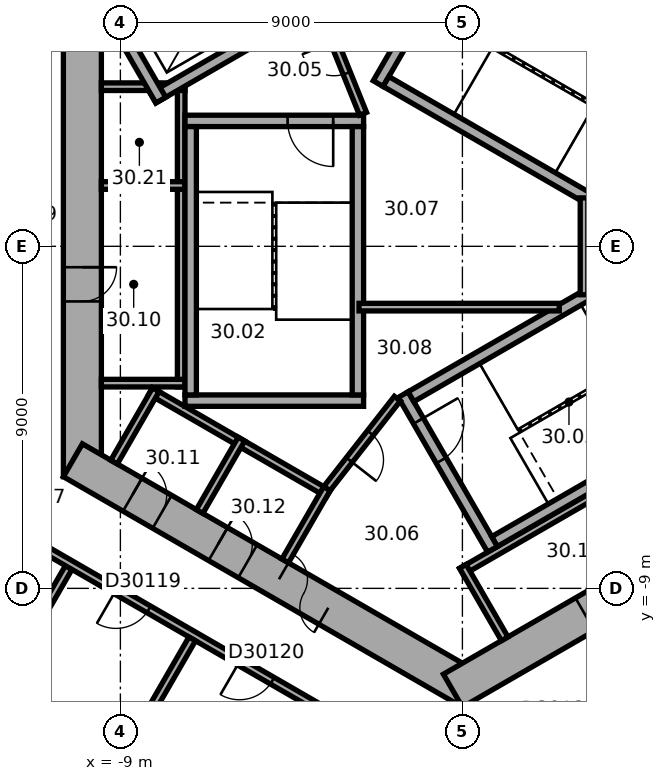
"""IFC4 building model, lengths in metres.
Left out: names, types, materials, properties, quantities, classifications, styles, units other than length and angle.
Written with IfcOpenShell. Run it as: python <this file> out.ifc"""

import sys

from ifc_helpers import new_model, si_unit, direction, frame, frame_2d, origin, place, context, subcontext, project, spatial, rectangle, extrude, element, fill, save


model = new_model("IFC4")
c1 = context("Model", 3, precision=1e-05, world=origin(), true_north=direction((0.0, 1.0)))
c2 = subcontext(c1, "Body", "Model", "MODEL_VIEW")
j1 = project(units=[si_unit("LENGTHUNIT", "METRE"), si_unit("PLANEANGLEUNIT", "RADIAN")], contexts=[c1])
p1 = place(None, origin())
s1 = spatial("IfcSite", under=j1, at=p1, CompositionType="ELEMENT")
p2 = place(p1, origin())
s2 = spatial("IfcBuilding", under=s1, at=p2, CompositionType="ELEMENT")
p3 = place(p2, frame((0.0, 0.0, 124.4)))
s3 = spatial("IfcBuildingStorey", under=s2, at=p3, CompositionType="ELEMENT", Elevation=124.4)
p4 = place(p3, frame((-10.0, 6.062, 0.0), z_axis=(0.0, 0.0, 1.0), x_axis=(0.0, -1.0, 0.0)))
e1 = element("IfcWall", 1, at=p4, inside=s3, PredefinedType="SHEAR", context=c2, shape_type="SweptSolid", body=[
    extrude(rectangle(XDim=12.125, YDim=1.0, at=frame_2d((6.062, 0.0))), origin(), (0.0, 0.0, 1.0), 3.7),
])
p5 = place(p4, frame((6.612, 0.0, 0.0)))
e2 = element("IfcOpeningElement", 2, at=p5, cuts=e1, PredefinedType="OPENING", context=c2, shape_type="SweptSolid", body=[
    extrude(rectangle(XDim=0.9, YDim=2.1, at=frame_2d((0.45, 1.05))), frame((0.0, 0.51, 0.0), z_axis=(0.0, -1.0, 0.0), x_axis=(1.0, 0.0, 0.0)), (0.0, 0.0, 1.0), 1.02),
])
p6 = place(p3, frame((-10.25, -5.629, 0.0), z_axis=(0.0, 0.0, 1.0), x_axis=(0.866022616891, -0.50000482701, 0.0)))
e3 = element("IfcWall", 3, at=p6, inside=s3, PredefinedType="SHEAR", context=c2, shape_type="SweptSolid", body=[
    extrude(rectangle(XDim=12.125, YDim=1.0, at=frame_2d((6.062, 0.0))), origin(), (0.0, 0.0, 1.0), 3.7),
])
p7 = place(p6, frame((6.262, 0.0, 0.0)))
e4 = element("IfcOpeningElement", 4, at=p7, cuts=e3, PredefinedType="OPENING", context=c2, shape_type="SweptSolid", body=[
    extrude(rectangle(XDim=1.5, YDim=2.1, at=frame_2d((0.75, 1.05))), frame((0.0, 0.51, 0.0), z_axis=(0.0, -1.0, 0.0), x_axis=(1.0, 0.0, 0.0)), (0.0, 0.0, 1.0), 1.02),
])
p8 = place(p6, frame((1.812, 0.0, 0.0)))
e5 = element("IfcOpeningElement", 5, at=p8, cuts=e3, PredefinedType="OPENING", context=c2, shape_type="SweptSolid", body=[
    extrude(rectangle(XDim=0.9, YDim=2.1, at=frame_2d((0.45, 1.05))), frame((0.0, 0.51, 0.0), z_axis=(0.0, -1.0, 0.0), x_axis=(1.0, 0.0, 0.0)), (0.0, 0.0, 1.0), 1.02),
])
p9 = place(p6, frame((4.412, 0.0, 0.0)))
e6 = element("IfcOpeningElement", 6, at=p9, cuts=e3, PredefinedType="OPENING", context=c2, shape_type="SweptSolid", body=[
    extrude(rectangle(XDim=0.9, YDim=2.1, at=frame_2d((0.45, 1.05))), frame((0.0, 0.51, 0.0), z_axis=(0.0, -1.0, 0.0), x_axis=(1.0, 0.0, 0.0)), (0.0, 0.0, 1.0), 1.02),
])
p10 = place(p3, frame((-0.25, -11.691, 0.0), z_axis=(0.0, 0.0, 1.0), x_axis=(0.866022616891, 0.50000482701, 0.0)))
e7 = element("IfcWall", 7, at=p10, inside=s3, PredefinedType="SHEAR", context=c2, shape_type="SweptSolid", body=[
    extrude(rectangle(XDim=12.125, YDim=1.0, at=frame_2d((6.062, 0.0))), origin(), (0.0, 0.0, 1.0), 3.7),
])
p11 = place(p10, frame((4.012, 0.0, 0.0)))
e8 = element("IfcOpeningElement", 8, at=p11, cuts=e7, PredefinedType="OPENING", context=c2, shape_type="SweptSolid", body=[
    extrude(rectangle(XDim=0.9, YDim=2.1, at=frame_2d((0.45, 1.05))), frame((0.0, 0.51, 0.0), z_axis=(0.0, -1.0, 0.0), x_axis=(1.0, 0.0, 0.0)), (0.0, 0.0, 1.0), 1.02),
])
p12 = place(p10, frame((7.812, 0.0, 0.0)))
e9 = element("IfcOpeningElement", 9, at=p12, cuts=e7, PredefinedType="OPENING", context=c2, shape_type="SweptSolid", body=[
    extrude(rectangle(XDim=1.1, YDim=2.1, at=frame_2d((0.55, 1.05))), frame((0.0, 0.51, 0.0), z_axis=(0.0, -1.0, 0.0), x_axis=(1.0, 0.0, 0.0)), (0.0, 0.0, 1.0), 1.02),
])
for number, where, z_axis, x_axis in (
    (10, (7.424, 4.259, 0.0), (0.0, 0.0, 1.0), (-0.866, 0.5, 0.0)),
    (11, (-7.4, 4.3, 0.0), (0.0, 0.0, 1.0), (0.0, -1.0, 0.0)),
):
    element("IfcWall", number, at=place(p3, frame(where, z_axis=z_axis, x_axis=x_axis)), inside=s3, PredefinedType="PARTITIONING", context=c2, shape_type="SweptSolid", body=[
        extrude(rectangle(XDim=8.0, YDim=0.2, at=frame_2d((4.0, 0.0))), origin(), (0.0, 0.0, 1.0), 3.42),
    ])
for number, where, z_axis, x_axis in (
    (12, (-7.3, 4.2, 0.0), (0.0, 0.0, 1.0), (-1.0, 0.0, 0.0)),
    (13, (-7.3, 1.6, 0.0), (0.0, 0.0, 1.0), (-1.0, 0.0, 0.0)),
    (14, (-7.3, -3.6, 0.0), (0.0, 0.0, 1.0), (-1.0, 0.0, 0.0)),
):
    element("IfcWall", number, at=place(p3, frame(where, z_axis=z_axis, x_axis=x_axis)), inside=s3, PredefinedType="PARTITIONING", context=c2, shape_type="SweptSolid", body=[
        extrude(rectangle(XDim=2.2, YDim=0.2, at=frame_2d((1.1, 0.0))), origin(), (0.0, 0.0, 1.0), 3.42),
    ])
p13 = place(p3, frame((-8.203, -3.809, 0.0), z_axis=(0.0, 0.0, 1.0), x_axis=(0.866028230842, -0.499995103361, 0.0)))
e15 = element("IfcWall", 15, at=p13, inside=s3, PredefinedType="PARTITIONING", context=c2, shape_type="SweptSolid", body=[
    extrude(rectangle(XDim=5.4, YDim=0.2, at=frame_2d((2.7, 0.0))), origin(), (0.0, 0.0, 1.0), 3.42),
])
for number, where, z_axis, x_axis in (
    (16, (-8.067, -3.772, 0.0), (0.0, 0.0, 1.0), (-0.5, -0.866, 0.0)),
    (17, (-5.815, -5.072, 0.0), (0.0, 0.0, 1.0), (-0.5, -0.866, 0.0)),
):
    element("IfcWall", number, at=place(p3, frame(where, z_axis=z_axis, x_axis=x_axis)), inside=s3, PredefinedType="PARTITIONING", context=c2, shape_type="SweptSolid", body=[
        extrude(rectangle(XDim=2.2, YDim=0.2, at=frame_2d((1.1, 0.0))), origin(), (0.0, 0.0, 1.0), 3.42),
    ])
p14 = place(p3, frame((-3.563, -6.372, 0.0), z_axis=(0.0, 0.0, 1.0), x_axis=(-0.499994660107, -0.866028486751, 0.0)))
e18 = element("IfcWall", 18, at=p14, inside=s3, PredefinedType="PARTITIONING", context=c2, shape_type="SweptSolid", body=[
    extrude(rectangle(XDim=2.2, YDim=0.2, at=frame_2d((1.1, 0.0))), origin(), (0.0, 0.0, 1.0), 3.42),
])
p15 = place(p3, frame((-0.024, -8.559, 0.0), z_axis=(0.0, 0.0, 1.0), x_axis=(0.866026010844, 0.49999894854, 0.0)))
e19 = element("IfcWall", 19, at=p15, inside=s3, PredefinedType="PARTITIONING", context=c2, shape_type="SweptSolid", body=[
    extrude(rectangle(XDim=8.0, YDim=0.2, at=frame_2d((4.0, 0.0))), origin(), (0.0, 0.0, 1.0), 3.42),
])
p16 = place(p3, frame((0.013, -8.422, 0.0), z_axis=(0.0, 0.0, 1.0), x_axis=(0.500077893725, -0.86598042715, 0.0)))
e20 = element("IfcWall", 20, at=p16, inside=s3, PredefinedType="PARTITIONING", context=c2, shape_type="SweptSolid", body=[
    extrude(rectangle(XDim=2.2, YDim=0.2, at=frame_2d((1.1, 0.0))), origin(), (0.0, 0.0, 1.0), 3.42),
])
p17 = place(p3, frame((-2.216, 4.282, 0.0), z_axis=(0.0, 0.0, 1.0), x_axis=(0.499977259774, 0.866038532462, 0.0)))
e21 = element("IfcWall", 21, at=p17, inside=s3, PredefinedType="SHEAR", context=c2, shape_type="SweptSolid", body=[
    extrude(rectangle(XDim=4.7, YDim=0.3, at=frame_2d((2.35, 0.0))), origin(), (0.0, 0.0, 1.0), 3.42),
])
for number, where, z_axis, x_axis in (
    (22, (4.103, 0.807, 0.0), (0.0, 0.0, 1.0), (-0.866, 0.5, 0.0)),
    (23, (6.303, 4.617, 0.0), (0.0, 0.0, 1.0), (-0.866, 0.5, 0.0)),
):
    element("IfcWall", number, at=place(p3, frame(where, z_axis=z_axis, x_axis=x_axis)), inside=s3, PredefinedType="SHEAR", context=c2, shape_type="SweptSolid", body=[
        extrude(rectangle(XDim=7.06, YDim=0.3, at=frame_2d((3.53, 0.0))), origin(), (0.0, 0.0, 1.0), 3.42),
    ])
p18 = place(p3, frame((-2.6, 3.3, 0.0), z_axis=(0.0, 0.0, 1.0), x_axis=(-1.0, 0.0, 0.0)))
e24 = element("IfcWall", 24, at=p18, inside=s3, PredefinedType="SHEAR", context=c2, shape_type="SweptSolid", body=[
    extrude(rectangle(XDim=4.7, YDim=0.3, at=frame_2d((2.35, 0.0))), origin(), (0.0, 0.0, 1.0), 3.42),
])
p19 = place(p18, frame((0.8, 0.0, 0.0)))
e25 = element("IfcOpeningElement", 25, at=p19, cuts=e24, PredefinedType="OPENING", context=c2, shape_type="SweptSolid", body=[
    extrude(rectangle(XDim=1.2, YDim=2.1, at=frame_2d((0.6, 1.05))), frame((0.0, 0.16, 0.0), z_axis=(0.0, -1.0, 0.0), x_axis=(1.0, 0.0, 0.0)), (0.0, 0.0, 1.0), 0.32),
])
p20 = place(p3, frame((-2.6, -4.06, 0.0), z_axis=(0.0, 0.0, 1.0), x_axis=(-1.0, 0.0, 0.0)))
e26 = element("IfcWall", 26, at=p20, inside=s3, PredefinedType="SHEAR", context=c2, shape_type="SweptSolid", body=[
    extrude(rectangle(XDim=4.7, YDim=0.3, at=frame_2d((2.35, 0.0))), origin(), (0.0, 0.0, 1.0), 3.42),
])
for number, where, z_axis, x_axis in (
    (27, (-2.75, 3.15, 0.0), (0.0, 0.0, 1.0), (0.0, -1.0, 0.0)),
    (28, (-7.15, 3.15, 0.0), (0.0, 0.0, 1.0), (0.0, -1.0, 0.0)),
):
    element("IfcWall", number, at=place(p3, frame(where, z_axis=z_axis, x_axis=x_axis)), inside=s3, PredefinedType="SHEAR", context=c2, shape_type="SweptSolid", body=[
        extrude(rectangle(XDim=7.06, YDim=0.3, at=frame_2d((3.53, 0.0))), origin(), (0.0, 0.0, 1.0), 3.42),
    ])
p21 = place(p3, frame((-1.558, -3.902, 0.0), z_axis=(0.0, 0.0, 1.0), x_axis=(0.499977259774, -0.866038532462, 0.0)))
e29 = element("IfcWall", 29, at=p21, inside=s3, PredefinedType="SHEAR", context=c2, shape_type="SweptSolid", body=[
    extrude(rectangle(XDim=4.7, YDim=0.3, at=frame_2d((2.35, 0.0))), origin(), (0.0, 0.0, 1.0), 3.42),
])
p22 = place(p21, frame((0.8, 0.0, 0.0)))
e30 = element("IfcOpeningElement", 30, at=p22, cuts=e29, PredefinedType="OPENING", context=c2, shape_type="SweptSolid", body=[
    extrude(rectangle(XDim=1.2, YDim=2.1, at=frame_2d((0.6, 1.05))), frame((0.0, 0.16, 0.0), z_axis=(0.0, -1.0, 0.0), x_axis=(1.0, 0.0, 0.0)), (0.0, 0.0, 1.0), 0.32),
])
for number, where, z_axis, x_axis in (
    (31, (-1.353, -3.957, 0.0), (0.0, 0.0, 1.0), (0.866, 0.5, 0.0)),
    (32, (0.847, -7.767, 0.0), (0.0, 0.0, 1.0), (0.866, 0.5, 0.0)),
):
    element("IfcWall", number, at=place(p3, frame(where, z_axis=z_axis, x_axis=x_axis)), inside=s3, PredefinedType="SHEAR", context=c2, shape_type="SweptSolid", body=[
        extrude(rectangle(XDim=7.06, YDim=0.3, at=frame_2d((3.53, 0.0))), origin(), (0.0, 0.0, 1.0), 3.42),
    ])
p23 = place(p3, frame((-5.24, 5.577, 0.0), z_axis=(0.0, 0.0, 1.0), x_axis=(-0.866014461049, -0.500018952895, 0.0)))
e33 = element("IfcWall", 33, at=p23, inside=s3, PredefinedType="SHEAR", context=c2, shape_type="SweptSolid", body=[
    extrude(rectangle(XDim=3.35, YDim=0.3, at=frame_2d((1.675, 0.0))), origin(), (0.0, 0.0, 1.0), 3.42),
])
p24 = place(p3, frame((-7.937, 3.847, 0.0), z_axis=(0.0, 0.0, 1.0), x_axis=(-0.50002983664, 0.866008176907, 0.0)))
e34 = element("IfcWall", 34, at=p24, inside=s3, PredefinedType="SHEAR", context=c2, shape_type="SweptSolid", body=[
    extrude(rectangle(XDim=2.2, YDim=0.3, at=frame_2d((1.1, 0.0))), origin(), (0.0, 0.0, 1.0), 3.42),
])
p25 = place(p3, frame((-2.615, 3.487, 0.0), z_axis=(0.0, 0.0, 1.0), x_axis=(-0.373576831041, 0.92759924068, 0.0)))
e35 = element("IfcWall", 35, at=p25, inside=s3, PredefinedType="PARTITIONING", context=c2, shape_type="SweptSolid", body=[
    extrude(rectangle(XDim=3.002, YDim=0.2, at=frame_2d((1.501, 0.0))), origin(), (0.0, 0.0, 1.0), 3.42),
])
p26 = place(p25, frame((1.15, 0.0, 0.0)))
e36 = element("IfcOpeningElement", 36, at=p26, cuts=e35, PredefinedType="OPENING", context=c2, shape_type="SweptSolid", body=[
    extrude(rectangle(XDim=0.9, YDim=2.1, at=frame_2d((0.45, 1.05))), frame((0.0, 0.11, 0.0), z_axis=(0.0, -1.0, 0.0), x_axis=(1.0, 0.0, 0.0)), (0.0, 0.0, 1.0), 0.22),
])
p27 = place(p3, frame((-1.712, -4.008, 0.0), z_axis=(0.0, 0.0, 1.0), x_axis=(-0.616549420702, -0.787316208287, 0.0)))
e37 = element("IfcWall", 37, at=p27, inside=s3, PredefinedType="PARTITIONING", context=c2, shape_type="SweptSolid", body=[
    extrude(rectangle(XDim=3.002, YDim=0.2, at=frame_2d((1.501, 0.0))), origin(), (0.0, 0.0, 1.0), 3.42),
])
p28 = place(p27, frame((1.15, 0.0, 0.0)))
e38 = element("IfcOpeningElement", 38, at=p28, cuts=e37, PredefinedType="OPENING", context=c2, shape_type="SweptSolid", body=[
    extrude(rectangle(XDim=0.9, YDim=2.1, at=frame_2d((0.45, 1.05))), frame((0.0, 0.11, 0.0), z_axis=(0.0, -1.0, 0.0), x_axis=(1.0, 0.0, 0.0)), (0.0, 0.0, 1.0), 0.22),
])
p29 = place(p3, frame((-2.72, -1.6, 0.0), z_axis=(0.0, 0.0, 1.0), x_axis=(1.0, 0.0, 0.0)))
e39 = element("IfcWall", 39, at=p29, inside=s3, PredefinedType="PARTITIONING", context=c2, shape_type="SweptSolid", body=[
    extrude(rectangle(XDim=5.269, YDim=0.2, at=frame_2d((2.634, 0.0))), origin(), (0.0, 0.0, 1.0), 3.42),
])
p30 = place(p3, frame((3.2, -1.275, 0.0), z_axis=(0.0, 0.0, 1.0), x_axis=(0.0, 1.0, 0.0)))
e40 = element("IfcWall", 40, at=p30, inside=s3, PredefinedType="PARTITIONING", context=c2, shape_type="SweptSolid", body=[
    extrude(rectangle(XDim=2.549, YDim=0.2, at=frame_2d((1.275, 0.0))), origin(), (0.0, 0.0, 1.0), 3.42),
])
p31 = place(p3, frame((-14.486, -15.597, 0.0), z_axis=(0.0, 0.0, 1.0), x_axis=(0.499996545922, 0.866027397988, 0.0)))
e41 = element("IfcWall", 41, at=p31, inside=s3, PredefinedType="PARTITIONING", context=c2, shape_type="SweptSolid", body=[
    extrude(rectangle(XDim=8.25, YDim=0.2, at=frame_2d((4.125, 0.0))), origin(), (0.0, 0.0, 1.0), 3.42),
])
p32 = place(p3, frame((-11.415, -7.728, 0.0), z_axis=(0.0, 0.0, 1.0), x_axis=(0.866022749921, -0.500004596598, 0.0)))
e42 = element("IfcWall", 42, at=p32, inside=s3, PredefinedType="PARTITIONING", context=c2, shape_type="SweptSolid", body=[
    extrude(rectangle(XDim=12.084, YDim=0.2, at=frame_2d((6.042, 0.0))), origin(), (0.0, 0.0, 1.0), 3.42),
])
p33 = place(p32, frame((2.652, 0.0, 0.0)))
e43 = element("IfcOpeningElement", 43, at=p33, cuts=e42, PredefinedType="OPENING", context=c2, shape_type="SweptSolid", body=[
    extrude(rectangle(XDim=1.0, YDim=2.1, at=frame_2d((0.5, 1.05))), frame((0.0, 0.11, 0.0), z_axis=(0.0, -1.0, 0.0), x_axis=(1.0, 0.0, 0.0)), (0.0, 0.0, 1.0), 0.22),
])
p34 = place(p32, frame((6.406, 0.0, 0.0)))
e44 = element("IfcOpeningElement", 44, at=p34, cuts=e42, PredefinedType="OPENING", context=c2, shape_type="SweptSolid", body=[
    extrude(rectangle(XDim=1.0, YDim=2.1, at=frame_2d((0.5, 1.05))), frame((0.0, 0.11, 0.0), z_axis=(0.0, -1.0, 0.0), x_axis=(1.0, 0.0, 0.0)), (0.0, 0.0, 1.0), 0.22),
])
p35 = place(p32, frame((9.934, 0.0, 0.0)))
e45 = element("IfcOpeningElement", 45, at=p35, cuts=e42, PredefinedType="OPENING", context=c2, shape_type="SweptSolid", body=[
    extrude(rectangle(XDim=1.0, YDim=2.1, at=frame_2d((0.5, 1.05))), frame((0.0, 0.11, 0.0), z_axis=(0.0, -1.0, 0.0), x_axis=(1.0, 0.0, 0.0)), (0.0, 0.0, 1.0), 0.22),
])
p36 = place(p3, frame((-11.235, -17.474, 0.0), z_axis=(0.0, 0.0, 1.0), x_axis=(0.499996545922, 0.866027397988, 0.0)))
e46 = element("IfcWall", 46, at=p36, inside=s3, PredefinedType="PARTITIONING", context=c2, shape_type="SweptSolid", body=[
    extrude(rectangle(XDim=8.25, YDim=0.2, at=frame_2d((4.125, 0.0))), origin(), (0.0, 0.0, 1.0), 2.87),
])
p37 = place(p3, frame((1.204, -13.623, 0.0), z_axis=(0.0, 0.0, 1.0), x_axis=(0.866031867142, 0.49998880497, 0.0)))
e47 = element("IfcWall", 47, at=p37, inside=s3, PredefinedType="PARTITIONING", context=c2, shape_type="SweptSolid", body=[
    extrude(rectangle(XDim=6.268, YDim=0.2, at=frame_2d((3.134, 0.0))), origin(), (0.0, 0.0, 1.0), 3.42),
])
p38 = place(p37, frame((1.381, 0.0, 0.0)))
e48 = element("IfcOpeningElement", 48, at=p38, cuts=e47, PredefinedType="OPENING", context=c2, shape_type="SweptSolid", body=[
    extrude(rectangle(XDim=1.0, YDim=2.1, at=frame_2d((0.5, 1.05))), frame((0.0, 0.11, 0.0), z_axis=(0.0, -1.0, 0.0), x_axis=(1.0, 0.0, 0.0)), (0.0, 0.0, 1.0), 0.22),
])
p39 = place(p7, origin())
e49 = element("IfcDoor", 49, at=p39, inside=s3, OperationType="DOUBLE_DOOR_SINGLE_SWING", PredefinedType="DOOR", context=c2, shape_type="SweptSolid", body=[
    extrude(rectangle(XDim=1.5, YDim=2.1, at=frame_2d((0.75, 1.05))), frame((0.0, 0.025, 0.0), z_axis=(0.0, -1.0, 0.0), x_axis=(1.0, 0.0, 0.0)), (0.0, 0.0, 1.0), 0.05),
])
fill(e4, e49)
p40 = place(p19, origin())
e50 = element("IfcDoor", 50, at=p40, inside=s3, OperationType="SINGLE_SWING_RIGHT", PredefinedType="DOOR", context=c2, shape_type="SweptSolid", body=[
    extrude(rectangle(XDim=1.2, YDim=2.1, at=frame_2d((0.6, 1.05))), frame((0.0, 0.025, 0.0), z_axis=(0.0, -1.0, 0.0), x_axis=(1.0, 0.0, 0.0)), (0.0, 0.0, 1.0), 0.05),
])
fill(e25, e50)
p41 = place(p22, origin())
e51 = element("IfcDoor", 51, at=p41, inside=s3, OperationType="SINGLE_SWING_RIGHT", PredefinedType="DOOR", context=c2, shape_type="SweptSolid", body=[
    extrude(rectangle(XDim=1.2, YDim=2.1, at=frame_2d((0.6, 1.05))), frame((0.0, 0.025, 0.0), z_axis=(0.0, -1.0, 0.0), x_axis=(1.0, 0.0, 0.0)), (0.0, 0.0, 1.0), 0.05),
])
fill(e30, e51)
p42 = place(p26, origin())
e52 = element("IfcDoor", 52, at=p42, inside=s3, OperationType="SINGLE_SWING_LEFT", PredefinedType="DOOR", context=c2, shape_type="SweptSolid", body=[
    extrude(rectangle(XDim=0.9, YDim=2.1, at=frame_2d((0.45, 1.05))), frame((0.0, 0.025, 0.0), z_axis=(0.0, -1.0, 0.0), x_axis=(1.0, 0.0, 0.0)), (0.0, 0.0, 1.0), 0.05),
])
fill(e36, e52)
p43 = place(p28, origin())
e53 = element("IfcDoor", 53, at=p43, inside=s3, OperationType="SINGLE_SWING_LEFT", PredefinedType="DOOR", context=c2, shape_type="SweptSolid", body=[
    extrude(rectangle(XDim=0.9, YDim=2.1, at=frame_2d((0.45, 1.05))), frame((0.0, 0.025, 0.0), z_axis=(0.0, -1.0, 0.0), x_axis=(1.0, 0.0, 0.0)), (0.0, 0.0, 1.0), 0.05),
])
fill(e38, e53)
p44 = place(p5, origin())
e54 = element("IfcDoor", 54, at=p44, inside=s3, OperationType="SINGLE_SWING_LEFT", PredefinedType="DOOR", context=c2, shape_type="SweptSolid", body=[
    extrude(rectangle(XDim=0.9, YDim=2.1, at=frame_2d((0.45, 1.05))), frame((0.0, 0.025, 0.0), z_axis=(0.0, -1.0, 0.0), x_axis=(1.0, 0.0, 0.0)), (0.0, 0.0, 1.0), 0.05),
])
fill(e2, e54)
p45 = place(p8, origin())
e55 = element("IfcDoor", 55, at=p45, inside=s3, OperationType="SINGLE_SWING_LEFT", PredefinedType="DOOR", context=c2, shape_type="SweptSolid", body=[
    extrude(rectangle(XDim=0.9, YDim=2.1, at=frame_2d((0.45, 1.05))), frame((0.0, 0.025, 0.0), z_axis=(0.0, -1.0, 0.0), x_axis=(1.0, 0.0, 0.0)), (0.0, 0.0, 1.0), 0.05),
])
fill(e5, e55)
p46 = place(p9, origin())
e56 = element("IfcDoor", 56, at=p46, inside=s3, OperationType="SINGLE_SWING_LEFT", PredefinedType="DOOR", context=c2, shape_type="SweptSolid", body=[
    extrude(rectangle(XDim=0.9, YDim=2.1, at=frame_2d((0.45, 1.05))), frame((0.0, 0.025, 0.0), z_axis=(0.0, -1.0, 0.0), x_axis=(1.0, 0.0, 0.0)), (0.0, 0.0, 1.0), 0.05),
])
fill(e6, e56)
p47 = place(p11, origin())
e57 = element("IfcDoor", 57, at=p47, inside=s3, OperationType="SINGLE_SWING_LEFT", PredefinedType="DOOR", context=c2, shape_type="SweptSolid", body=[
    extrude(rectangle(XDim=0.9, YDim=2.1, at=frame_2d((0.45, 1.05))), frame((0.0, 0.025, 0.0), z_axis=(0.0, -1.0, 0.0), x_axis=(1.0, 0.0, 0.0)), (0.0, 0.0, 1.0), 0.05),
])
fill(e8, e57)
p48 = place(p33, origin())
e58 = element("IfcDoor", 58, at=p48, inside=s3, OperationType="SINGLE_SWING_LEFT", PredefinedType="DOOR", context=c2, shape_type="SweptSolid", body=[
    extrude(rectangle(XDim=1.0, YDim=2.1, at=frame_2d((0.5, 1.05))), frame((0.0, 0.025, 0.0), z_axis=(0.0, -1.0, 0.0), x_axis=(1.0, 0.0, 0.0)), (0.0, 0.0, 1.0), 0.05),
])
fill(e43, e58)
p49 = place(p34, origin())
e59 = element("IfcDoor", 59, at=p49, inside=s3, OperationType="SINGLE_SWING_LEFT", PredefinedType="DOOR", context=c2, shape_type="SweptSolid", body=[
    extrude(rectangle(XDim=1.0, YDim=2.1, at=frame_2d((0.5, 1.05))), frame((0.0, 0.025, 0.0), z_axis=(0.0, -1.0, 0.0), x_axis=(1.0, 0.0, 0.0)), (0.0, 0.0, 1.0), 0.05),
])
fill(e44, e59)
save(model, sys.argv[1])
